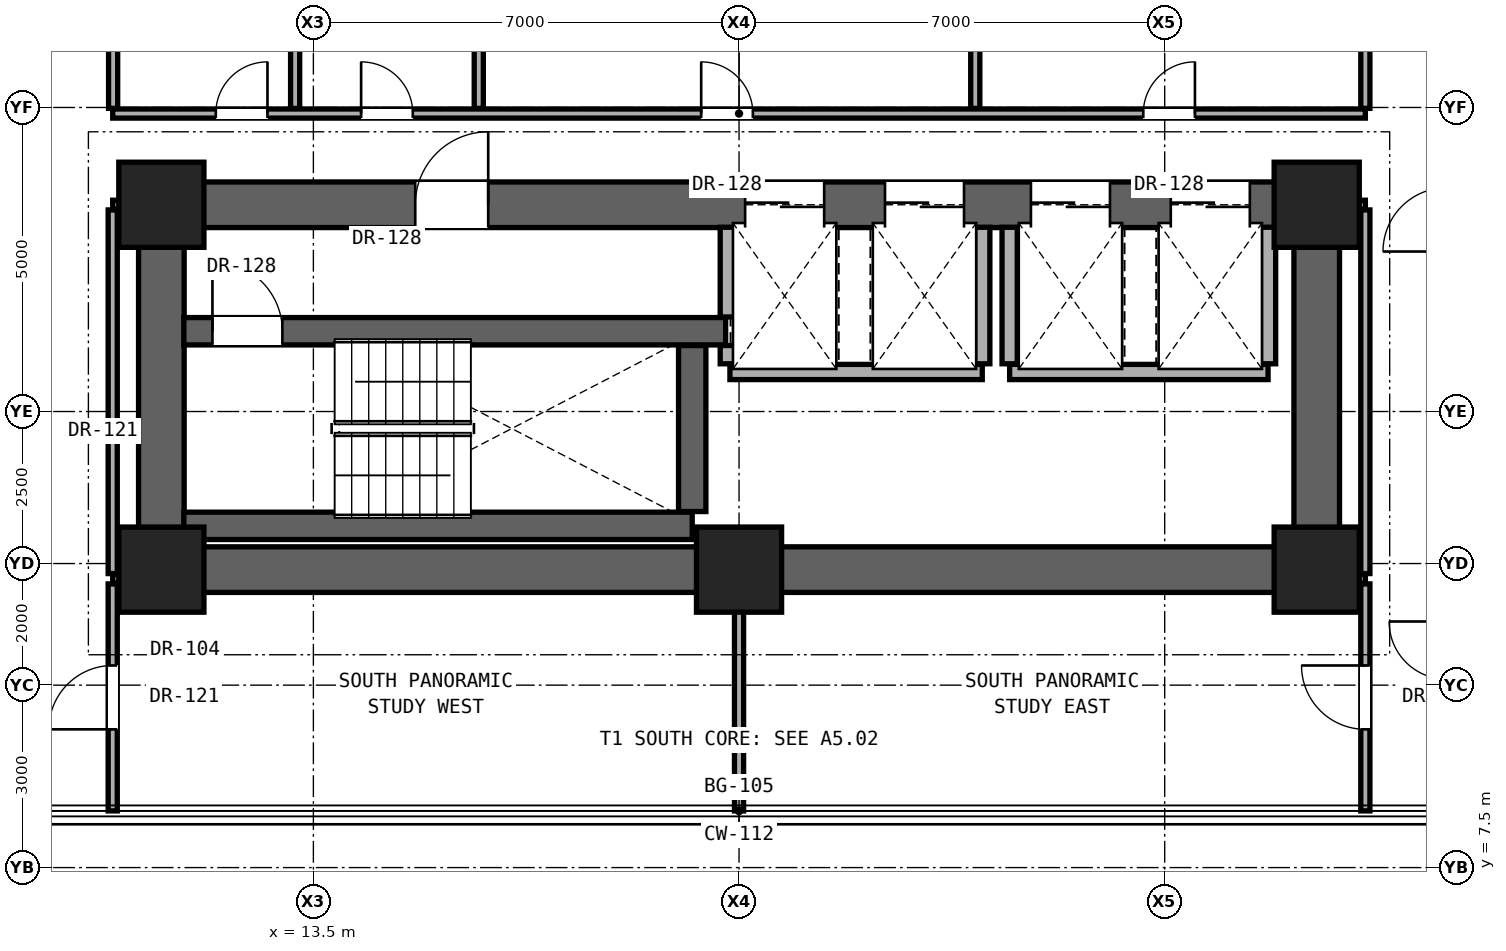
"""IFC4 building model, lengths in metres.
Left out: names, types, materials, properties, quantities, classifications, styles, units other than length and angle.
Written with IfcOpenShell. Run it as: python <this file> out.ifc"""

import sys

from ifc_helpers import new_model, si_unit, direction, frame, frame_2d, origin, origin_2d, place, context, subcontext, project, spatial, rectangle, extrude, element, fill, save


model = new_model("IFC4")
c1 = context("Model", 3, precision=1e-05, world=origin(), true_north=direction((0.0, 1.0)))
c2 = subcontext(c1, "Body", "Model", "MODEL_VIEW")
j1 = project(units=[si_unit("LENGTHUNIT", "METRE"), si_unit("PLANEANGLEUNIT", "RADIAN")], contexts=[c1])
p1 = place(None, origin())
s1 = spatial("IfcSite", under=j1, at=p1, CompositionType="ELEMENT")
p2 = place(p1, origin())
s2 = spatial("IfcBuilding", under=s1, at=p2, CompositionType="ELEMENT")
p3 = place(p2, frame((0.0, 0.0, 42.2)))
s3 = spatial("IfcBuildingStorey", under=s2, at=p3, CompositionType="ELEMENT", Elevation=42.2)
for number, where, z_axis, x_axis in (
    (1, (11.0, 12.4, 0.0), (0.0, 0.0, 1.0), (1.0, 0.0, 0.0)),
    (2, (20.5, 12.4, 0.0), (0.0, 0.0, 1.0), (1.0, 0.0, 0.0)),
    (3, (30.0, 12.4, 0.0), (0.0, 0.0, 1.0), (1.0, 0.0, 0.0)),
    (4, (11.0, 18.4, 0.0), (0.0, 0.0, 1.0), (1.0, 0.0, 0.0)),
    (5, (30.0, 18.4, 0.0), (0.0, 0.0, 1.0), (1.0, 0.0, 0.0)),
):
    element("IfcColumn", number, at=place(p3, frame(where, z_axis=z_axis, x_axis=x_axis)), inside=s3, PredefinedType="COLUMN", context=c2, shape_type="SweptSolid", body=[
        extrude(rectangle(XDim=1.4, YDim=1.4, at=origin_2d()), origin(), (0.0, 0.0, 1.0), 3.3),
    ])
p4 = place(p3, frame((11.0, 12.4, 0.0), z_axis=(0.0, 0.0, 1.0), x_axis=(1.0, 0.0, 0.0)))
e6 = element("IfcWall", 6, at=p4, inside=s3, PredefinedType="SHEAR", context=c2, shape_type="SweptSolid", body=[
    extrude(rectangle(XDim=19.0, YDim=0.75, at=frame_2d((9.5, 0.0))), origin(), (0.0, 0.0, 1.0), 3.06),
])
for number, where, z_axis, x_axis in (
    (7, (11.0, 12.4, 0.0), (0.0, 0.0, 1.0), (0.0, 1.0, 0.0)),
    (8, (30.0, 12.4, 0.0), (0.0, 0.0, 1.0), (0.0, 1.0, 0.0)),
):
    element("IfcWall", number, at=place(p3, frame(where, z_axis=z_axis, x_axis=x_axis)), inside=s3, PredefinedType="SHEAR", context=c2, shape_type="SweptSolid", body=[
        extrude(rectangle(XDim=6.0, YDim=0.75, at=frame_2d((3.0, 0.0))), origin(), (0.0, 0.0, 1.0), 3.06),
    ])
p5 = place(p3, frame((11.0, 18.4, 0.0), z_axis=(0.0, 0.0, 1.0), x_axis=(1.0, 0.0, 0.0)))
e9 = element("IfcWall", 9, at=p5, inside=s3, PredefinedType="SHEAR", context=c2, shape_type="SweptSolid", body=[
    extrude(rectangle(XDim=19.0, YDim=0.75, at=frame_2d((9.5, 0.0))), origin(), (0.0, 0.0, 1.0), 3.06),
])
p6 = place(p5, frame((4.175, 0.0, 0.0)))
e10 = element("IfcOpeningElement", 10, at=p6, cuts=e9, PredefinedType="OPENING", context=c2, shape_type="SweptSolid", body=[
    extrude(rectangle(XDim=1.2, YDim=2.25, at=frame_2d((0.6, 1.125))), frame((0.0, 0.385, 0.0), z_axis=(0.0, -1.0, 0.0), x_axis=(1.0, 0.0, 0.0)), (0.0, 0.0, 1.0), 0.77),
])
p7 = place(p5, frame((9.6, 0.0, 0.0)))
e11 = element("IfcOpeningElement", 11, at=p7, cuts=e9, PredefinedType="OPENING", context=c2, shape_type="SweptSolid", body=[
    extrude(rectangle(XDim=1.3, YDim=2.3, at=frame_2d((0.65, 1.15))), frame((0.0, 0.385, 0.0), z_axis=(0.0, -1.0, 0.0), x_axis=(1.0, 0.0, 0.0)), (0.0, 0.0, 1.0), 0.77),
])
p8 = place(p5, frame((11.9, 0.0, 0.0)))
e12 = element("IfcOpeningElement", 12, at=p8, cuts=e9, PredefinedType="OPENING", context=c2, shape_type="SweptSolid", body=[
    extrude(rectangle(XDim=1.3, YDim=2.3, at=frame_2d((0.65, 1.15))), frame((0.0, 0.385, 0.0), z_axis=(0.0, -1.0, 0.0), x_axis=(1.0, 0.0, 0.0)), (0.0, 0.0, 1.0), 0.77),
])
p9 = place(p5, frame((14.3, 0.0, 0.0)))
e13 = element("IfcOpeningElement", 13, at=p9, cuts=e9, PredefinedType="OPENING", context=c2, shape_type="SweptSolid", body=[
    extrude(rectangle(XDim=1.3, YDim=2.3, at=frame_2d((0.65, 1.15))), frame((0.0, 0.385, 0.0), z_axis=(0.0, -1.0, 0.0), x_axis=(1.0, 0.0, 0.0)), (0.0, 0.0, 1.0), 0.77),
])
p10 = place(p5, frame((16.6, 0.0, 0.0)))
e14 = element("IfcOpeningElement", 14, at=p10, cuts=e9, PredefinedType="OPENING", context=c2, shape_type="SweptSolid", body=[
    extrude(rectangle(XDim=1.3, YDim=2.3, at=frame_2d((0.65, 1.15))), frame((0.0, 0.385, 0.0), z_axis=(0.0, -1.0, 0.0), x_axis=(1.0, 0.0, 0.0)), (0.0, 0.0, 1.0), 0.77),
])
for number, where, z_axis, x_axis in (
    (15, (10.2, 12.25, 0.0), (0.0, 0.0, 1.0), (1.0, 0.0, 0.0)),
    (16, (30.37, 12.25, 0.0), (0.0, 0.0, 1.0), (1.0, 0.0, 0.0)),
):
    element("IfcWall", number, at=place(p3, frame(where, z_axis=z_axis, x_axis=x_axis)), inside=s3, PredefinedType="PARTITIONING", context=c2, shape_type="SweptSolid", body=[
        extrude(rectangle(XDim=0.43, YDim=0.15, at=frame_2d((0.215, 0.0))), origin(), (0.0, 0.0, 1.0), 3.06),
    ])
p11 = place(p3, frame((11.37, 13.12, 0.0), z_axis=(0.0, 0.0, 1.0), x_axis=(1.0, 0.0, 0.0)))
e17 = element("IfcWall", 17, at=p11, inside=s3, PredefinedType="SHEAR", context=c2, shape_type="SweptSolid", body=[
    extrude(rectangle(XDim=8.36, YDim=0.45, at=frame_2d((4.18, 0.0))), origin(), (0.0, 0.0, 1.0), 3.06),
])
p12 = place(p3, frame((20.35, 15.65, 0.0), z_axis=(0.0, 0.0, 1.0), x_axis=(1.0, 0.0, 0.0)))
e18 = element("IfcWall", 18, at=p12, inside=s3, PredefinedType="SOLIDWALL", context=c2, shape_type="SweptSolid", body=[
    extrude(rectangle(XDim=4.15, YDim=0.25, at=frame_2d((2.075, 0.0))), origin(), (0.0, 0.0, 1.0), 3.06),
])
p13 = place(p3, frame((24.95, 15.65, 0.0), z_axis=(0.0, 0.0, 1.0), x_axis=(1.0, 0.0, 0.0)))
e19 = element("IfcWall", 19, at=p13, inside=s3, PredefinedType="SOLIDWALL", context=c2, shape_type="SweptSolid", body=[
    extrude(rectangle(XDim=4.25, YDim=0.25, at=frame_2d((2.125, 0.0))), origin(), (0.0, 0.0, 1.0), 3.06),
])
p14 = place(p3, frame((11.37, 16.32, 0.0), z_axis=(0.0, 0.0, 1.0), x_axis=(1.0, 0.0, 0.0)))
e20 = element("IfcWall", 20, at=p14, inside=s3, PredefinedType="SHEAR", context=c2, shape_type="SweptSolid", body=[
    extrude(rectangle(XDim=8.91, YDim=0.45, at=frame_2d((4.455, 0.0))), origin(), (0.0, 0.0, 1.0), 3.06),
])
p15 = place(p14, frame((0.47, 0.0, 0.0)))
e21 = element("IfcOpeningElement", 21, at=p15, cuts=e20, PredefinedType="OPENING", context=c2, shape_type="SweptSolid", body=[
    extrude(rectangle(XDim=1.15, YDim=2.2, at=frame_2d((0.575, 1.1))), frame((0.0, 0.235, 0.0), z_axis=(0.0, -1.0, 0.0), x_axis=(1.0, 0.0, 0.0)), (0.0, 0.0, 1.0), 0.47),
])
for number, where, z_axis, x_axis in (
    (22, (10.2, 18.4, 0.0), (0.0, 0.0, 1.0), (1.0, 0.0, 0.0)),
    (23, (30.37, 18.4, 0.0), (0.0, 0.0, 1.0), (1.0, 0.0, 0.0)),
):
    element("IfcWall", number, at=place(p3, frame(where, z_axis=z_axis, x_axis=x_axis)), inside=s3, PredefinedType="PARTITIONING", context=c2, shape_type="SweptSolid", body=[
        extrude(rectangle(XDim=0.43, YDim=0.15, at=frame_2d((0.215, 0.0))), origin(), (0.0, 0.0, 1.0), 2.436),
    ])
p16 = place(p3, frame((10.2, 19.9, 0.0), z_axis=(0.0, 0.0, 1.0), x_axis=(1.0, 0.0, 0.0)))
e24 = element("IfcWall", 24, at=p16, inside=s3, PredefinedType="PARTITIONING", context=c2, shape_type="SweptSolid", body=[
    extrude(rectangle(XDim=20.6, YDim=0.15, at=frame_2d((10.3, 0.0))), origin(), (0.0, 0.0, 1.0), 2.104),
])
p17 = place(p16, frame((1.695, 0.0, 0.0)))
e25 = element("IfcOpeningElement", 25, at=p17, cuts=e24, PredefinedType="OPENING", context=c2, shape_type="SweptSolid", body=[
    extrude(rectangle(XDim=0.85, YDim=2.01, at=frame_2d((0.425, 1.005))), frame((0.0, 0.085, 0.0), z_axis=(0.0, -1.0, 0.0), x_axis=(1.0, 0.0, 0.0)), (0.0, 0.0, 1.0), 0.17),
])
p18 = place(p16, frame((4.085, 0.0, 0.0)))
e26 = element("IfcOpeningElement", 26, at=p18, cuts=e24, PredefinedType="OPENING", context=c2, shape_type="SweptSolid", body=[
    extrude(rectangle(XDim=0.85, YDim=2.01, at=frame_2d((0.425, 1.005))), frame((0.0, 0.085, 0.0), z_axis=(0.0, -1.0, 0.0), x_axis=(1.0, 0.0, 0.0)), (0.0, 0.0, 1.0), 0.17),
])
p19 = place(p16, frame((9.677, 0.0, 0.0)))
e27 = element("IfcOpeningElement", 27, at=p19, cuts=e24, PredefinedType="OPENING", context=c2, shape_type="SweptSolid", body=[
    extrude(rectangle(XDim=0.85, YDim=2.01, at=frame_2d((0.425, 1.005))), frame((0.0, 0.085, 0.0), z_axis=(0.0, -1.0, 0.0), x_axis=(1.0, 0.0, 0.0)), (0.0, 0.0, 1.0), 0.17),
])
p20 = place(p16, frame((16.948, 0.0, 0.0)))
e28 = element("IfcOpeningElement", 28, at=p20, cuts=e24, PredefinedType="OPENING", context=c2, shape_type="SweptSolid", body=[
    extrude(rectangle(XDim=0.85, YDim=2.01, at=frame_2d((0.425, 1.005))), frame((0.0, 0.085, 0.0), z_axis=(0.0, -1.0, 0.0), x_axis=(1.0, 0.0, 0.0)), (0.0, 0.0, 1.0), 0.17),
])
p21 = place(p3, frame((10.2, 8.432, 0.0), z_axis=(0.0, 0.0, 1.0), x_axis=(0.0, 1.0, 0.0)))
e29 = element("IfcWall", 29, at=p21, inside=s3, PredefinedType="PARTITIONING", context=c2, shape_type="SweptSolid", body=[
    extrude(rectangle(XDim=3.733, YDim=0.15, at=frame_2d((1.867, 0.0))), origin(), (0.0, 0.0, 1.0), 3.06),
])
p22 = place(p21, frame((1.342, 0.0, 0.0)))
e30 = element("IfcOpeningElement", 30, at=p22, cuts=e29, PredefinedType="OPENING", context=c2, shape_type="SweptSolid", body=[
    extrude(rectangle(XDim=1.05, YDim=2.2, at=frame_2d((0.525, 1.1))), frame((0.0, 0.085, 0.0), z_axis=(0.0, -1.0, 0.0), x_axis=(1.0, 0.0, 0.0)), (0.0, 0.0, 1.0), 0.17),
])
p23 = place(p3, frame((10.2, 12.335, 0.0), z_axis=(0.0, 0.0, 1.0), x_axis=(0.0, 1.0, 0.0)))
e31 = element("IfcWall", 31, at=p23, inside=s3, PredefinedType="PARTITIONING", context=c2, shape_type="SweptSolid", body=[
    extrude(rectangle(XDim=5.98, YDim=0.15, at=frame_2d((2.99, 0.0))), origin(), (0.0, 0.0, 1.0), 2.436),
])
for number, where, z_axis, x_axis in (
    (32, (10.207, 19.985, 0.0), (0.0, 0.0, 1.0), (0.0, 1.0, 0.0)),
    (33, (13.2, 19.985, 0.0), (0.0, 0.0, 1.0), (0.0, 1.0, 0.0)),
    (34, (16.22, 19.985, 0.0), (0.0, 0.0, 1.0), (0.0, 1.0, 0.0)),
):
    element("IfcWall", number, at=place(p3, frame(where, z_axis=z_axis, x_axis=x_axis)), inside=s3, PredefinedType="PARTITIONING", context=c2, shape_type="SweptSolid", body=[
        extrude(rectangle(XDim=2.78, YDim=0.15, at=frame_2d((1.39, 0.0))), origin(), (0.0, 0.0, 1.0), 3.06),
    ])
p24 = place(p3, frame((19.73, 13.355, 0.0), z_axis=(0.0, 0.0, 1.0), x_axis=(0.0, 1.0, 0.0)))
e35 = element("IfcWall", 35, at=p24, inside=s3, PredefinedType="SHEAR", context=c2, shape_type="SweptSolid", body=[
    extrude(rectangle(XDim=2.73, YDim=0.45, at=frame_2d((1.365, 0.0))), origin(), (0.0, 0.0, 1.0), 3.06),
])
p25 = place(p3, frame((20.315, 15.785, 0.0), z_axis=(0.0, 0.0, 1.0), x_axis=(0.0, 1.0, 0.0)))
e36 = element("IfcWall", 36, at=p25, inside=s3, PredefinedType="SOLIDWALL", context=c2, shape_type="SweptSolid", body=[
    extrude(rectangle(XDim=0.3, YDim=0.25, at=frame_2d((0.15, 0.0))), origin(), (0.0, 0.0, 1.0), 3.06),
])
p26 = place(p3, frame((20.315, 16.555, 0.0), z_axis=(0.0, 0.0, 1.0), x_axis=(0.0, 1.0, 0.0)))
e37 = element("IfcWall", 37, at=p26, inside=s3, PredefinedType="SOLIDWALL", context=c2, shape_type="SweptSolid", body=[
    extrude(rectangle(XDim=1.475, YDim=0.25, at=frame_2d((0.738, 0.0))), origin(), (0.0, 0.0, 1.0), 3.06),
])
p27 = place(p3, frame((20.5, 8.432, 0.0), z_axis=(0.0, 0.0, 1.0), x_axis=(0.0, 1.0, 0.0)))
e38 = element("IfcWall", 38, at=p27, inside=s3, PredefinedType="PARTITIONING", context=c2, shape_type="SweptSolid", body=[
    extrude(rectangle(XDim=3.598, YDim=0.15, at=frame_2d((1.799, 0.0))), origin(), (0.0, 0.0, 1.0), 3.06),
])
p28 = place(p3, frame((24.5, 15.785, 0.0), z_axis=(0.0, 0.0, 1.0), x_axis=(0.0, 1.0, 0.0)))
e39 = element("IfcWall", 39, at=p28, inside=s3, PredefinedType="SOLIDWALL", context=c2, shape_type="SweptSolid", body=[
    extrude(rectangle(XDim=2.245, YDim=0.25, at=frame_2d((1.123, 0.0))), origin(), (0.0, 0.0, 1.0), 3.06),
])
p29 = place(p3, frame((24.385, 19.985, 0.0), z_axis=(0.0, 0.0, 1.0), x_axis=(0.0, 1.0, 0.0)))
e40 = element("IfcWall", 40, at=p29, inside=s3, PredefinedType="PARTITIONING", context=c2, shape_type="SweptSolid", body=[
    extrude(rectangle(XDim=5.77, YDim=0.15, at=frame_2d((2.885, 0.0))), origin(), (0.0, 0.0, 1.0), 2.104),
])
for number, where, z_axis, x_axis in (
    (41, (24.95, 15.785, 0.0), (0.0, 0.0, 1.0), (0.0, 1.0, 0.0)),
    (42, (29.2, 15.785, 0.0), (0.0, 0.0, 1.0), (0.0, 1.0, 0.0)),
):
    element("IfcWall", number, at=place(p3, frame(where, z_axis=z_axis, x_axis=x_axis)), inside=s3, PredefinedType="SOLIDWALL", context=c2, shape_type="SweptSolid", body=[
        extrude(rectangle(XDim=2.245, YDim=0.25, at=frame_2d((1.123, 0.0))), origin(), (0.0, 0.0, 1.0), 3.06),
    ])
p30 = place(p3, frame((30.8, 8.432, 0.0), z_axis=(0.0, 0.0, 1.0), x_axis=(0.0, 1.0, 0.0)))
e43 = element("IfcWall", 43, at=p30, inside=s3, PredefinedType="PARTITIONING", context=c2, shape_type="SweptSolid", body=[
    extrude(rectangle(XDim=3.733, YDim=0.15, at=frame_2d((1.867, 0.0))), origin(), (0.0, 0.0, 1.0), 3.06),
])
p31 = place(p30, frame((1.342, 0.0, 0.0)))
e44 = element("IfcOpeningElement", 44, at=p31, cuts=e43, PredefinedType="OPENING", context=c2, shape_type="SweptSolid", body=[
    extrude(rectangle(XDim=1.05, YDim=2.2, at=frame_2d((0.525, 1.1))), frame((0.0, 0.085, 0.0), z_axis=(0.0, -1.0, 0.0), x_axis=(1.0, 0.0, 0.0)), (0.0, 0.0, 1.0), 0.17),
])
p32 = place(p3, frame((30.8, 12.335, 0.0), z_axis=(0.0, 0.0, 1.0), x_axis=(0.0, 1.0, 0.0)))
e45 = element("IfcWall", 45, at=p32, inside=s3, PredefinedType="PARTITIONING", context=c2, shape_type="SweptSolid", body=[
    extrude(rectangle(XDim=5.98, YDim=0.15, at=frame_2d((2.99, 0.0))), origin(), (0.0, 0.0, 1.0), 2.436),
])
p33 = place(p3, frame((30.8, 19.985, 0.0), z_axis=(0.0, 0.0, 1.0), x_axis=(0.0, 1.0, 0.0)))
e46 = element("IfcWall", 46, at=p33, inside=s3, PredefinedType="PARTITIONING", context=c2, shape_type="SweptSolid", body=[
    extrude(rectangle(XDim=5.77, YDim=0.15, at=frame_2d((2.885, 0.0))), origin(), (0.0, 0.0, 1.0), 2.279),
])
p34 = place(p6, origin())
e47 = element("IfcDoor", 47, at=p34, inside=s3, OperationType="SINGLE_SWING_RIGHT", PredefinedType="DOOR", context=c2, shape_type="SweptSolid", body=[
    extrude(rectangle(XDim=1.2, YDim=2.25, at=frame_2d((0.6, 1.125))), frame((0.0, 0.025, 0.0), z_axis=(0.0, -1.0, 0.0), x_axis=(1.0, 0.0, 0.0)), (0.0, 0.0, 1.0), 0.05),
])
fill(e10, e47)
p35 = place(p15, origin())
e48 = element("IfcDoor", 48, at=p35, inside=s3, OperationType="SINGLE_SWING_LEFT", PredefinedType="DOOR", context=c2, shape_type="SweptSolid", body=[
    extrude(rectangle(XDim=1.15, YDim=2.2, at=frame_2d((0.575, 1.1))), frame((0.0, 0.025, 0.0), z_axis=(0.0, -1.0, 0.0), x_axis=(1.0, 0.0, 0.0)), (0.0, 0.0, 1.0), 0.05),
])
fill(e21, e48)
p36 = place(p17, origin())
e49 = element("IfcDoor", 49, at=p36, inside=s3, OperationType="SINGLE_SWING_RIGHT", PredefinedType="DOOR", context=c2, shape_type="SweptSolid", body=[
    extrude(rectangle(XDim=0.85, YDim=2.01, at=frame_2d((0.425, 1.005))), frame((0.0, 0.025, 0.0), z_axis=(0.0, -1.0, 0.0), x_axis=(1.0, 0.0, 0.0)), (0.0, 0.0, 1.0), 0.05),
])
fill(e25, e49)
p37 = place(p18, origin())
e50 = element("IfcDoor", 50, at=p37, inside=s3, OperationType="SINGLE_SWING_LEFT", PredefinedType="DOOR", context=c2, shape_type="SweptSolid", body=[
    extrude(rectangle(XDim=0.85, YDim=2.01, at=frame_2d((0.425, 1.005))), frame((0.0, 0.025, 0.0), z_axis=(0.0, -1.0, 0.0), x_axis=(1.0, 0.0, 0.0)), (0.0, 0.0, 1.0), 0.05),
])
fill(e26, e50)
p38 = place(p19, origin())
e51 = element("IfcDoor", 51, at=p38, inside=s3, OperationType="SINGLE_SWING_LEFT", PredefinedType="DOOR", context=c2, shape_type="SweptSolid", body=[
    extrude(rectangle(XDim=0.85, YDim=2.01, at=frame_2d((0.425, 1.005))), frame((0.0, 0.025, 0.0), z_axis=(0.0, -1.0, 0.0), x_axis=(1.0, 0.0, 0.0)), (0.0, 0.0, 1.0), 0.05),
])
fill(e27, e51)
p39 = place(p20, origin())
e52 = element("IfcDoor", 52, at=p39, inside=s3, OperationType="SINGLE_SWING_RIGHT", PredefinedType="DOOR", context=c2, shape_type="SweptSolid", body=[
    extrude(rectangle(XDim=0.85, YDim=2.01, at=frame_2d((0.425, 1.005))), frame((0.0, 0.025, 0.0), z_axis=(0.0, -1.0, 0.0), x_axis=(1.0, 0.0, 0.0)), (0.0, 0.0, 1.0), 0.05),
])
fill(e28, e52)
p40 = place(p22, origin())
e53 = element("IfcDoor", 53, at=p40, inside=s3, OperationType="SINGLE_SWING_LEFT", PredefinedType="DOOR", context=c2, shape_type="SweptSolid", body=[
    extrude(rectangle(XDim=1.05, YDim=2.2, at=frame_2d((0.525, 1.1))), frame((0.0, 0.025, 0.0), z_axis=(0.0, -1.0, 0.0), x_axis=(1.0, 0.0, 0.0)), (0.0, 0.0, 1.0), 0.05),
])
fill(e30, e53)
p41 = place(p31, origin())
e54 = element("IfcDoor", 54, at=p41, inside=s3, OperationType="SINGLE_SWING_RIGHT", PredefinedType="DOOR", context=c2, shape_type="SweptSolid", body=[
    extrude(rectangle(XDim=1.05, YDim=2.2, at=frame_2d((0.525, 1.1))), frame((0.0, 0.025, 0.0), z_axis=(0.0, -1.0, 0.0), x_axis=(1.0, 0.0, 0.0)), (0.0, 0.0, 1.0), 0.05),
])
fill(e44, e54)
p42 = place(p7, origin())
e55 = element("IfcDoor", 55, at=p42, inside=s3, OperationType="DOUBLE_DOOR_SLIDING", PredefinedType="DOOR", context=c2, shape_type="SweptSolid", body=[
    extrude(rectangle(XDim=1.3, YDim=2.3, at=frame_2d((0.65, 1.15))), frame((0.0, 0.025, 0.0), z_axis=(0.0, -1.0, 0.0), x_axis=(1.0, 0.0, 0.0)), (0.0, 0.0, 1.0), 0.05),
])
fill(e11, e55)
p43 = place(p8, origin())
e56 = element("IfcDoor", 56, at=p43, inside=s3, OperationType="DOUBLE_DOOR_SLIDING", PredefinedType="DOOR", context=c2, shape_type="SweptSolid", body=[
    extrude(rectangle(XDim=1.3, YDim=2.3, at=frame_2d((0.65, 1.15))), frame((0.0, 0.025, 0.0), z_axis=(0.0, -1.0, 0.0), x_axis=(1.0, 0.0, 0.0)), (0.0, 0.0, 1.0), 0.05),
])
fill(e12, e56)
p44 = place(p9, origin())
e57 = element("IfcDoor", 57, at=p44, inside=s3, OperationType="DOUBLE_DOOR_SLIDING", PredefinedType="DOOR", context=c2, shape_type="SweptSolid", body=[
    extrude(rectangle(XDim=1.3, YDim=2.3, at=frame_2d((0.65, 1.15))), frame((0.0, 0.025, 0.0), z_axis=(0.0, -1.0, 0.0), x_axis=(1.0, 0.0, 0.0)), (0.0, 0.0, 1.0), 0.05),
])
fill(e13, e57)
p45 = place(p10, origin())
e58 = element("IfcDoor", 58, at=p45, inside=s3, OperationType="DOUBLE_DOOR_SLIDING", PredefinedType="DOOR", context=c2, shape_type="SweptSolid", body=[
    extrude(rectangle(XDim=1.3, YDim=2.3, at=frame_2d((0.65, 1.15))), frame((0.0, 0.025, 0.0), z_axis=(0.0, -1.0, 0.0), x_axis=(1.0, 0.0, 0.0)), (0.0, 0.0, 1.0), 0.05),
])
fill(e14, e58)
save(model, sys.argv[1])
